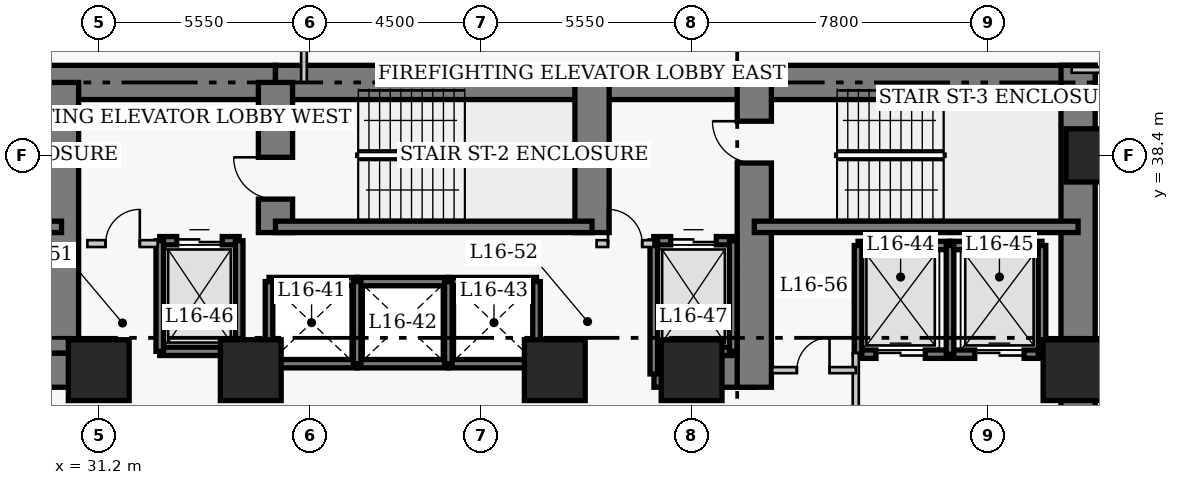
"""IFC4 building model, lengths in metres.
Left out: names, types, materials, properties, quantities, classifications, styles, units other than length and angle.
Written with IfcOpenShell. Run it as: python <this file> out.ifc"""

import sys

from ifc_helpers import new_model, si_unit, direction, frame, frame_2d, origin, origin_2d, place, context, subcontext, project, spatial, rectangle, extrude, element, fill, save


model = new_model("IFC4")
c1 = context("Model", 3, precision=1e-05, world=origin(), true_north=direction((0.0, 1.0)))
c2 = subcontext(c1, "Body", "Model", "MODEL_VIEW")
j1 = project(units=[si_unit("LENGTHUNIT", "METRE"), si_unit("PLANEANGLEUNIT", "RADIAN")], contexts=[c1])
p1 = place(None, origin())
s1 = spatial("IfcSite", under=j1, at=p1, CompositionType="ELEMENT")
p2 = place(p1, origin())
s2 = spatial("IfcBuilding", under=s1, at=p2, CompositionType="ELEMENT")
p3 = place(p2, frame((0.0, 0.0, 67.8)))
s3 = spatial("IfcBuildingStorey", under=s2, at=p3, CompositionType="ELEMENT", Elevation=67.8)
p4 = place(p3, frame((21.45, 40.32, 0.0), z_axis=(0.0, 0.0, 1.0), x_axis=(1.0, 0.0, 0.0)))
e1 = element("IfcWall", 1, at=p4, inside=s3, PredefinedType="SHEAR", context=c2, shape_type="SweptSolid", body=[
    extrude(rectangle(XDim=14.4, YDim=0.9, at=frame_2d((7.2, 0.0))), origin(), (0.0, 0.0, 1.0), 3.8),
])
p5 = place(p3, frame((35.85, 40.32, 0.0), z_axis=(0.0, 0.0, 1.0), x_axis=(1.0, 0.0, 0.0)))
e2 = element("IfcWall", 2, at=p5, inside=s3, PredefinedType="SHEAR", context=c2, shape_type="SweptSolid", body=[
    extrude(rectangle(XDim=12.6, YDim=0.9, at=frame_2d((6.3, 0.0))), origin(), (0.0, 0.0, 1.0), 3.8),
])
p6 = place(p3, frame((48.45, 40.32, 0.0), z_axis=(0.0, 0.0, 1.0), x_axis=(1.0, 0.0, 0.0)))
e3 = element("IfcWall", 3, at=p6, inside=s3, PredefinedType="SHEAR", context=c2, shape_type="SweptSolid", body=[
    extrude(rectangle(XDim=8.97, YDim=0.9, at=frame_2d((4.485, 0.0))), origin(), (0.0, 0.0, 1.0), 3.8),
])
p7 = place(p3, frame((56.97, 27.05, 0.0), z_axis=(0.0, 0.0, 1.0), x_axis=(0.0, 1.0, 0.0)))
e4 = element("IfcWall", 4, at=p7, inside=s3, PredefinedType="SHEAR", context=c2, shape_type="SweptSolid", body=[
    extrude(rectangle(XDim=13.72, YDim=0.9, at=frame_2d((6.86, 0.0))), origin(), (0.0, 0.0, 1.0), 3.8),
])
p8 = place(p3, frame((28.45, 32.75, 0.0), z_axis=(0.0, 0.0, 1.0), x_axis=(1.0, 0.0, 0.0)))
e5 = element("IfcWall", 5, at=p8, inside=s3, PredefinedType="SHEAR", context=c2, shape_type="SweptSolid", body=[
    extrude(rectangle(XDim=2.4, YDim=0.9, at=frame_2d((1.2, 0.0))), origin(), (0.0, 0.0, 1.0), 3.8),
])
p9 = place(p3, frame((45.81, 32.75, 0.0), z_axis=(0.0, 0.0, 1.0), x_axis=(1.0, 0.0, 0.0)))
e6 = element("IfcWall", 6, at=p9, inside=s3, PredefinedType="SHEAR", context=c2, shape_type="SweptSolid", body=[
    extrude(rectangle(XDim=2.64, YDim=0.9, at=frame_2d((1.32, 0.0))), origin(), (0.0, 0.0, 1.0), 3.8),
])
p10 = place(p3, frame((30.22, 33.2, 0.0), z_axis=(0.0, 0.0, 1.0), x_axis=(0.0, 1.0, 0.0)))
e7 = element("IfcWall", 7, at=p10, inside=s3, PredefinedType="SHEAR", context=c2, shape_type="SweptSolid", body=[
    extrude(rectangle(XDim=7.12, YDim=0.9, at=frame_2d((3.56, 0.0))), origin(), (0.0, 0.0, 1.0), 3.8),
])
p11 = place(p3, frame((35.85, 36.37, 0.0), z_axis=(0.0, 0.0, 1.0), x_axis=(0.0, 1.0, 0.0)))
e8 = element("IfcWall", 8, at=p11, inside=s3, PredefinedType="SHEAR", context=c2, shape_type="SweptSolid", body=[
    extrude(rectangle(XDim=3.95, YDim=0.9, at=frame_2d((1.975, 0.0))), origin(), (0.0, 0.0, 1.0), 3.8),
])
p12 = place(p11, frame((0.88, 0.0, 0.0)))
e9 = element("IfcOpeningElement", 9, at=p12, cuts=e8, PredefinedType="OPENING", context=c2, shape_type="SweptSolid", body=[
    extrude(rectangle(XDim=1.1, YDim=2.15, at=frame_2d((0.55, 1.075))), frame((0.0, 0.46, 0.0), z_axis=(0.0, -1.0, 0.0), x_axis=(1.0, 0.0, 0.0)), (0.0, 0.0, 1.0), 0.92),
])
p13 = place(p3, frame((44.18, 36.37, 0.0), z_axis=(0.0, 0.0, 1.0), x_axis=(0.0, 1.0, 0.0)))
e10 = element("IfcWall", 10, at=p13, inside=s3, PredefinedType="SHEAR", context=c2, shape_type="SweptSolid", body=[
    extrude(rectangle(XDim=3.95, YDim=0.9, at=frame_2d((1.975, 0.0))), origin(), (0.0, 0.0, 1.0), 3.8),
])
p14 = place(p3, frame((48.45, 32.3, 0.0), z_axis=(0.0, 0.0, 1.0), x_axis=(0.0, 1.0, 0.0)))
e11 = element("IfcWall", 11, at=p14, inside=s3, PredefinedType="SHEAR", context=c2, shape_type="SweptSolid", body=[
    extrude(rectangle(XDim=8.02, YDim=0.9, at=frame_2d((4.01, 0.0))), origin(), (0.0, 0.0, 1.0), 3.8),
])
p15 = place(p14, frame((5.9, 0.0, 0.0)))
e12 = element("IfcOpeningElement", 12, at=p15, cuts=e11, PredefinedType="OPENING", context=c2, shape_type="SweptSolid", body=[
    extrude(rectangle(XDim=1.1, YDim=2.15, at=frame_2d((0.55, 1.075))), frame((0.0, 0.46, 0.0), z_axis=(0.0, -1.0, 0.0), x_axis=(1.0, 0.0, 0.0)), (0.0, 0.0, 1.0), 0.92),
])
p16 = place(p3, frame((21.9, 36.52, 0.0), z_axis=(0.0, 0.0, 1.0), x_axis=(1.0, 0.0, 0.0)))
e13 = element("IfcWall", 13, at=p16, inside=s3, PredefinedType="SHEAR", context=c2, shape_type="SweptSolid", body=[
    extrude(rectangle(XDim=8.32, YDim=0.3, at=frame_2d((4.16, 0.0))), origin(), (0.0, 0.0, 1.0), 3.8),
])
p17 = place(p16, frame((0.9, 0.0, 0.0)))
e14 = element("IfcOpeningElement", 14, at=p17, cuts=e13, PredefinedType="OPENING", context=c2, shape_type="SweptSolid", body=[
    extrude(rectangle(XDim=1.1, YDim=2.15, at=frame_2d((0.55, 1.075))), frame((0.0, 0.16, 0.0), z_axis=(0.0, -1.0, 0.0), x_axis=(1.0, 0.0, 0.0)), (0.0, 0.0, 1.0), 0.32),
])
p18 = place(p3, frame((35.85, 36.52, 0.0), z_axis=(0.0, 0.0, 1.0), x_axis=(1.0, 0.0, 0.0)))
e15 = element("IfcWall", 15, at=p18, inside=s3, PredefinedType="SHEAR", context=c2, shape_type="SweptSolid", body=[
    extrude(rectangle(XDim=8.33, YDim=0.3, at=frame_2d((4.165, 0.0))), origin(), (0.0, 0.0, 1.0), 3.8),
])
p19 = place(p3, frame((48.45, 36.52, 0.0), z_axis=(0.0, 0.0, 1.0), x_axis=(1.0, 0.0, 0.0)))
e16 = element("IfcWall", 16, at=p19, inside=s3, PredefinedType="SHEAR", context=c2, shape_type="SweptSolid", body=[
    extrude(rectangle(XDim=8.52, YDim=0.3, at=frame_2d((4.26, 0.0))), origin(), (0.0, 0.0, 1.0), 3.8),
])
p20 = place(p3, frame((57.35, 38.4, 0.0), z_axis=(0.0, 0.0, 1.0), x_axis=(1.0, 0.0, 0.0)))
e17 = element("IfcColumn", 17, at=p20, inside=s3, PredefinedType="COLUMN", context=c2, shape_type="SweptSolid", body=[
    extrude(rectangle(XDim=1.4, YDim=1.4, at=origin_2d()), origin(), (0.0, 0.0, 1.0), 3.8),
])
for number, where, z_axis, x_axis in (
    (18, (31.2, 32.75, 0.0), (0.0, 0.0, 1.0), (1.0, 0.0, 0.0)),
    (19, (35.2, 32.75, 0.0), (0.0, 0.0, 1.0), (1.0, 0.0, 0.0)),
    (20, (43.2, 32.75, 0.0), (0.0, 0.0, 1.0), (1.0, 0.0, 0.0)),
    (21, (46.8, 32.75, 0.0), (0.0, 0.0, 1.0), (1.0, 0.0, 0.0)),
    (22, (56.85, 32.75, 0.0), (0.0, 0.0, 1.0), (1.0, 0.0, 0.0)),
):
    element("IfcColumn", number, at=place(p3, frame(where, z_axis=z_axis, x_axis=x_axis)), inside=s3, PredefinedType="COLUMN", context=c2, shape_type="SweptSolid", body=[
        extrude(rectangle(XDim=1.6, YDim=1.6, at=origin_2d()), origin(), (0.0, 0.0, 1.0), 3.8),
    ])
for number, where, z_axis, x_axis in (
    (23, (35.68, 35.08, 0.0), (0.0, 0.0, 1.0), (1.0, 0.0, 0.0)),
    (24, (35.68, 32.92, 0.0), (0.0, 0.0, 1.0), (1.0, 0.0, 0.0)),
):
    element("IfcWall", number, at=place(p3, frame(where, z_axis=z_axis, x_axis=x_axis)), inside=s3, PredefinedType="SHEAR", context=c2, shape_type="SweptSolid", body=[
        extrude(rectangle(XDim=2.32, YDim=0.22, at=frame_2d((1.16, 0.0))), origin(), (0.0, 0.0, 1.0), 3.8),
    ])
p21 = place(p3, frame((35.68, 32.92, 0.0), z_axis=(0.0, 0.0, 1.0), x_axis=(0.0, 1.0, 0.0)))
e25 = element("IfcWall", 25, at=p21, inside=s3, PredefinedType="SHEAR", context=c2, shape_type="SweptSolid", body=[
    extrude(rectangle(XDim=2.16, YDim=0.2, at=frame_2d((1.08, 0.0))), origin(), (0.0, 0.0, 1.0), 3.8),
])
for number, where, z_axis, x_axis in (
    (26, (38.0, 35.08, 0.0), (0.0, 0.0, 1.0), (1.0, 0.0, 0.0)),
    (27, (38.0, 32.92, 0.0), (0.0, 0.0, 1.0), (1.0, 0.0, 0.0)),
):
    element("IfcWall", number, at=place(p3, frame(where, z_axis=z_axis, x_axis=x_axis)), inside=s3, PredefinedType="SHEAR", context=c2, shape_type="SweptSolid", body=[
        extrude(rectangle(XDim=2.4, YDim=0.22, at=frame_2d((1.2, 0.0))), origin(), (0.0, 0.0, 1.0), 3.8),
    ])
p22 = place(p3, frame((38.0, 32.92, 0.0), z_axis=(0.0, 0.0, 1.0), x_axis=(0.0, 1.0, 0.0)))
e28 = element("IfcWall", 28, at=p22, inside=s3, PredefinedType="SHEAR", context=c2, shape_type="SweptSolid", body=[
    extrude(rectangle(XDim=2.16, YDim=0.2, at=frame_2d((1.08, 0.0))), origin(), (0.0, 0.0, 1.0), 3.8),
])
for number, where, z_axis, x_axis in (
    (29, (40.4, 35.08, 0.0), (0.0, 0.0, 1.0), (1.0, 0.0, 0.0)),
    (30, (40.4, 32.92, 0.0), (0.0, 0.0, 1.0), (1.0, 0.0, 0.0)),
):
    element("IfcWall", number, at=place(p3, frame(where, z_axis=z_axis, x_axis=x_axis)), inside=s3, PredefinedType="SHEAR", context=c2, shape_type="SweptSolid", body=[
        extrude(rectangle(XDim=2.32, YDim=0.22, at=frame_2d((1.16, 0.0))), origin(), (0.0, 0.0, 1.0), 3.8),
    ])
for number, where, z_axis, x_axis in (
    (31, (40.4, 32.92, 0.0), (0.0, 0.0, 1.0), (0.0, 1.0, 0.0)),
    (32, (42.72, 32.92, 0.0), (0.0, 0.0, 1.0), (0.0, 1.0, 0.0)),
):
    element("IfcWall", number, at=place(p3, frame(where, z_axis=z_axis, x_axis=x_axis)), inside=s3, PredefinedType="SHEAR", context=c2, shape_type="SweptSolid", body=[
        extrude(rectangle(XDim=2.16, YDim=0.2, at=frame_2d((1.08, 0.0))), origin(), (0.0, 0.0, 1.0), 3.8),
    ])
p23 = place(p3, frame((51.18, 36.03, 0.0), z_axis=(0.0, 0.0, 1.0), x_axis=(1.0, 0.0, 0.0)))
e33 = element("IfcWall", 33, at=p23, inside=s3, PredefinedType="SHEAR", context=c2, shape_type="SweptSolid", body=[
    extrude(rectangle(XDim=2.42, YDim=0.22, at=frame_2d((1.21, 0.0))), origin(), (0.0, 0.0, 1.0), 3.8),
])
p24 = place(p3, frame((51.18, 33.17, 0.0), z_axis=(0.0, 0.0, 1.0), x_axis=(1.0, 0.0, 0.0)))
e34 = element("IfcWall", 34, at=p24, inside=s3, PredefinedType="SHEAR", context=c2, shape_type="SweptSolid", body=[
    extrude(rectangle(XDim=2.42, YDim=0.22, at=frame_2d((1.21, 0.0))), origin(), (0.0, 0.0, 1.0), 3.8),
])
p25 = place(p24, frame((0.47, 0.0, 0.0)))
e35 = element("IfcOpeningElement", 35, at=p25, cuts=e34, PredefinedType="OPENING", context=c2, shape_type="SweptSolid", body=[
    extrude(rectangle(XDim=1.3, YDim=2.15, at=frame_2d((0.65, 1.075))), frame((0.0, 0.12, 0.0), z_axis=(0.0, -1.0, 0.0), x_axis=(1.0, 0.0, 0.0)), (0.0, 0.0, 1.0), 0.24),
])
p26 = place(p3, frame((51.18, 33.17, 0.0), z_axis=(0.0, 0.0, 1.0), x_axis=(0.0, 1.0, 0.0)))
e36 = element("IfcWall", 36, at=p26, inside=s3, PredefinedType="SHEAR", context=c2, shape_type="SweptSolid", body=[
    extrude(rectangle(XDim=2.86, YDim=0.2, at=frame_2d((1.43, 0.0))), origin(), (0.0, 0.0, 1.0), 3.8),
])
p27 = place(p3, frame((53.6, 36.03, 0.0), z_axis=(0.0, 0.0, 1.0), x_axis=(1.0, 0.0, 0.0)))
e37 = element("IfcWall", 37, at=p27, inside=s3, PredefinedType="SHEAR", context=c2, shape_type="SweptSolid", body=[
    extrude(rectangle(XDim=2.42, YDim=0.22, at=frame_2d((1.21, 0.0))), origin(), (0.0, 0.0, 1.0), 3.8),
])
p28 = place(p3, frame((53.6, 33.17, 0.0), z_axis=(0.0, 0.0, 1.0), x_axis=(1.0, 0.0, 0.0)))
e38 = element("IfcWall", 38, at=p28, inside=s3, PredefinedType="SHEAR", context=c2, shape_type="SweptSolid", body=[
    extrude(rectangle(XDim=2.42, YDim=0.22, at=frame_2d((1.21, 0.0))), origin(), (0.0, 0.0, 1.0), 3.8),
])
p29 = place(p28, frame((0.65, 0.0, 0.0)))
e39 = element("IfcOpeningElement", 39, at=p29, cuts=e38, PredefinedType="OPENING", context=c2, shape_type="SweptSolid", body=[
    extrude(rectangle(XDim=1.3, YDim=2.15, at=frame_2d((0.65, 1.075))), frame((0.0, 0.12, 0.0), z_axis=(0.0, -1.0, 0.0), x_axis=(1.0, 0.0, 0.0)), (0.0, 0.0, 1.0), 0.24),
])
for number, where, z_axis, x_axis in (
    (40, (53.6, 33.17, 0.0), (0.0, 0.0, 1.0), (0.0, 1.0, 0.0)),
    (41, (56.02, 33.17, 0.0), (0.0, 0.0, 1.0), (0.0, 1.0, 0.0)),
):
    element("IfcWall", number, at=place(p3, frame(where, z_axis=z_axis, x_axis=x_axis)), inside=s3, PredefinedType="SHEAR", context=c2, shape_type="SweptSolid", body=[
        extrude(rectangle(XDim=2.86, YDim=0.2, at=frame_2d((1.43, 0.0))), origin(), (0.0, 0.0, 1.0), 3.8),
    ])
p30 = place(p3, frame((32.805, 36.155, 0.0), z_axis=(0.0, 0.0, 1.0), x_axis=(1.0, 0.0, 0.0)))
e42 = element("IfcWall", 42, at=p30, inside=s3, PredefinedType="SHEAR", context=c2, shape_type="SweptSolid", body=[
    extrude(rectangle(XDim=2.09, YDim=0.22, at=frame_2d((1.045, 0.0))), origin(), (0.0, 0.0, 1.0), 3.8),
])
p31 = place(p30, frame((0.445, 0.0, 0.0)))
e43 = element("IfcOpeningElement", 43, at=p31, cuts=e42, PredefinedType="OPENING", context=c2, shape_type="SweptSolid", body=[
    extrude(rectangle(XDim=1.2, YDim=2.15, at=frame_2d((0.6, 1.075))), frame((0.0, 0.12, 0.0), z_axis=(0.0, -1.0, 0.0), x_axis=(1.0, 0.0, 0.0)), (0.0, 0.0, 1.0), 0.24),
])
p32 = place(p3, frame((32.805, 33.245, 0.0), z_axis=(0.0, 0.0, 1.0), x_axis=(1.0, 0.0, 0.0)))
e44 = element("IfcWall", 44, at=p32, inside=s3, PredefinedType="SHEAR", context=c2, shape_type="SweptSolid", body=[
    extrude(rectangle(XDim=2.09, YDim=0.22, at=frame_2d((1.045, 0.0))), origin(), (0.0, 0.0, 1.0), 3.8),
])
for number, where, z_axis, x_axis in (
    (45, (32.805, 33.245, 0.0), (0.0, 0.0, 1.0), (0.0, 1.0, 0.0)),
    (46, (34.895, 33.245, 0.0), (0.0, 0.0, 1.0), (0.0, 1.0, 0.0)),
):
    element("IfcWall", number, at=place(p3, frame(where, z_axis=z_axis, x_axis=x_axis)), inside=s3, PredefinedType="SHEAR", context=c2, shape_type="SweptSolid", body=[
        extrude(rectangle(XDim=2.91, YDim=0.2, at=frame_2d((1.455, 0.0))), origin(), (0.0, 0.0, 1.0), 3.8),
    ])
p33 = place(p3, frame((45.805, 36.155, 0.0), z_axis=(0.0, 0.0, 1.0), x_axis=(1.0, 0.0, 0.0)))
e47 = element("IfcWall", 47, at=p33, inside=s3, PredefinedType="SHEAR", context=c2, shape_type="SweptSolid", body=[
    extrude(rectangle(XDim=2.09, YDim=0.22, at=frame_2d((1.045, 0.0))), origin(), (0.0, 0.0, 1.0), 3.8),
])
p34 = place(p33, frame((0.445, 0.0, 0.0)))
e48 = element("IfcOpeningElement", 48, at=p34, cuts=e47, PredefinedType="OPENING", context=c2, shape_type="SweptSolid", body=[
    extrude(rectangle(XDim=1.2, YDim=2.15, at=frame_2d((0.6, 1.075))), frame((0.0, 0.12, 0.0), z_axis=(0.0, -1.0, 0.0), x_axis=(1.0, 0.0, 0.0)), (0.0, 0.0, 1.0), 0.24),
])
p35 = place(p3, frame((45.805, 33.245, 0.0), z_axis=(0.0, 0.0, 1.0), x_axis=(1.0, 0.0, 0.0)))
e49 = element("IfcWall", 49, at=p35, inside=s3, PredefinedType="SHEAR", context=c2, shape_type="SweptSolid", body=[
    extrude(rectangle(XDim=2.09, YDim=0.22, at=frame_2d((1.045, 0.0))), origin(), (0.0, 0.0, 1.0), 3.8),
])
p36 = place(p3, frame((45.805, 32.65, 0.0), z_axis=(0.0, 0.0, 1.0), x_axis=(0.0, 1.0, 0.0)))
e50 = element("IfcWall", 50, at=p36, inside=s3, PredefinedType="SHEAR", context=c2, shape_type="SweptSolid", body=[
    extrude(rectangle(XDim=3.505, YDim=0.2, at=frame_2d((1.752, 0.0))), origin(), (0.0, 0.0, 1.0), 3.8),
])
p37 = place(p3, frame((47.895, 33.245, 0.0), z_axis=(0.0, 0.0, 1.0), x_axis=(0.0, 1.0, 0.0)))
e51 = element("IfcWall", 51, at=p37, inside=s3, PredefinedType="SHEAR", context=c2, shape_type="SweptSolid", body=[
    extrude(rectangle(XDim=2.91, YDim=0.2, at=frame_2d((1.455, 0.0))), origin(), (0.0, 0.0, 1.0), 3.8),
])
p38 = place(p3, frame((30.9, 36.08, 0.0), z_axis=(0.0, 0.0, 1.0), x_axis=(1.0, 0.0, 0.0)))
e52 = element("IfcWall", 52, at=p38, inside=s3, PredefinedType="PARTITIONING", context=c2, shape_type="SweptSolid", body=[
    extrude(rectangle(XDim=1.85, YDim=0.18, at=frame_2d((0.925, 0.0))), origin(), (0.0, 0.0, 1.0), 3.54),
])
p39 = place(p38, frame((0.48, 0.0, 0.0)))
e53 = element("IfcOpeningElement", 53, at=p39, cuts=e52, PredefinedType="OPENING", context=c2, shape_type="SweptSolid", body=[
    extrude(rectangle(XDim=0.9, YDim=2.15, at=frame_2d((0.45, 1.075))), frame((0.0, 0.1, 0.0), z_axis=(0.0, -1.0, 0.0), x_axis=(1.0, 0.0, 0.0)), (0.0, 0.0, 1.0), 0.2),
])
p40 = place(p3, frame((44.3, 36.08, 0.0), z_axis=(0.0, 0.0, 1.0), x_axis=(1.0, 0.0, 0.0)))
e54 = element("IfcWall", 54, at=p40, inside=s3, PredefinedType="PARTITIONING", context=c2, shape_type="SweptSolid", body=[
    extrude(rectangle(XDim=1.5, YDim=0.18, at=frame_2d((0.75, 0.0))), origin(), (0.0, 0.0, 1.0), 3.54),
])
p41 = place(p40, frame((0.3, 0.0, 0.0)))
e55 = element("IfcOpeningElement", 55, at=p41, cuts=e54, PredefinedType="OPENING", context=c2, shape_type="SweptSolid", body=[
    extrude(rectangle(XDim=0.9, YDim=2.15, at=frame_2d((0.45, 1.075))), frame((0.0, 0.1, 0.0), z_axis=(0.0, -1.0, 0.0), x_axis=(1.0, 0.0, 0.0)), (0.0, 0.0, 1.0), 0.2),
])
p42 = place(p3, frame((51.12, 29.5, 0.0), z_axis=(0.0, 0.0, 1.0), x_axis=(0.0, 1.0, 0.0)))
e56 = element("IfcWall", 56, at=p42, inside=s3, PredefinedType="PARTITIONING", context=c2, shape_type="SweptSolid", body=[
    extrude(rectangle(XDim=3.7, YDim=0.16, at=frame_2d((1.85, 0.0))), origin(), (0.0, 0.0, 1.0), 3.54),
])
p43 = place(p42, frame((0.9, 0.0, 0.0)))
e57 = element("IfcOpeningElement", 57, at=p43, cuts=e56, PredefinedType="OPENING", context=c2, shape_type="SweptSolid", body=[
    extrude(rectangle(XDim=1.1, YDim=2.15, at=frame_2d((0.55, 1.075))), frame((0.0, 0.09, 0.0), z_axis=(0.0, -1.0, 0.0), x_axis=(1.0, 0.0, 0.0)), (0.0, 0.0, 1.0), 0.18),
])
p44 = place(p3, frame((48.92, 32.75, 0.0), z_axis=(0.0, 0.0, 1.0), x_axis=(1.0, 0.0, 0.0)))
e58 = element("IfcWall", 58, at=p44, inside=s3, PredefinedType="PARTITIONING", context=c2, shape_type="SweptSolid", body=[
    extrude(rectangle(XDim=2.2, YDim=0.16, at=frame_2d((1.1, 0.0))), origin(), (0.0, 0.0, 1.0), 3.54),
])
p45 = place(p44, frame((0.65, 0.0, 0.0)))
e59 = element("IfcOpeningElement", 59, at=p45, cuts=e58, PredefinedType="OPENING", context=c2, shape_type="SweptSolid", body=[
    extrude(rectangle(XDim=0.86, YDim=2.05, at=frame_2d((0.43, 1.025))), frame((0.0, 0.09, 0.0), z_axis=(0.0, -1.0, 0.0), x_axis=(1.0, 0.0, 0.0)), (0.0, 0.0, 1.0), 0.18),
])
p46 = place(p3, frame((56.8, 40.65, 0.0), z_axis=(0.0, 0.0, 1.0), x_axis=(1.0, 0.0, 0.0)))
e60 = element("IfcWall", 60, at=p46, inside=s3, PredefinedType="PARTITIONING", context=c2, shape_type="SweptSolid", body=[
    extrude(rectangle(XDim=4.66, YDim=0.15, at=frame_2d((2.33, 0.0))), origin(), (0.0, 0.0, 1.0), 3.54),
])
p47 = place(p46, frame((3.05, 0.0, 0.0)))
e61 = element("IfcOpeningElement", 61, at=p47, cuts=e60, PredefinedType="OPENING", context=c2, shape_type="SweptSolid", body=[
    extrude(rectangle(XDim=1.0, YDim=2.15, at=frame_2d((0.5, 1.075))), frame((0.0, 0.085, 0.0), z_axis=(0.0, -1.0, 0.0), x_axis=(1.0, 0.0, 0.0)), (0.0, 0.0, 1.0), 0.17),
])
p48 = place(p3, frame((36.6, 40.32, 0.0), z_axis=(0.0, 0.0, 1.0), x_axis=(0.0, 1.0, 0.0)))
e62 = element("IfcWall", 62, at=p48, inside=s3, PredefinedType="PARTITIONING", context=c2, shape_type="SweptSolid", body=[
    extrude(rectangle(XDim=5.045, YDim=0.15, at=frame_2d((2.522, 0.0))), origin(), (0.0, 0.0, 1.0), 3.54),
])
p49 = place(p25, origin())
e63 = element("IfcDoor", 63, at=p49, inside=s3, OperationType="DOUBLE_DOOR_SLIDING", PredefinedType="DOOR", context=c2, shape_type="SweptSolid", body=[
    extrude(rectangle(XDim=1.3, YDim=2.15, at=frame_2d((0.65, 1.075))), frame((0.0, 0.025, 0.0), z_axis=(0.0, -1.0, 0.0), x_axis=(1.0, 0.0, 0.0)), (0.0, 0.0, 1.0), 0.05),
])
fill(e35, e63)
p50 = place(p29, origin())
e64 = element("IfcDoor", 64, at=p50, inside=s3, OperationType="DOUBLE_DOOR_SLIDING", PredefinedType="DOOR", context=c2, shape_type="SweptSolid", body=[
    extrude(rectangle(XDim=1.3, YDim=2.15, at=frame_2d((0.65, 1.075))), frame((0.0, 0.025, 0.0), z_axis=(0.0, -1.0, 0.0), x_axis=(1.0, 0.0, 0.0)), (0.0, 0.0, 1.0), 0.05),
])
fill(e39, e64)
p51 = place(p31, origin())
e65 = element("IfcDoor", 65, at=p51, inside=s3, OperationType="DOUBLE_DOOR_SLIDING", PredefinedType="DOOR", context=c2, shape_type="SweptSolid", body=[
    extrude(rectangle(XDim=1.2, YDim=2.15, at=frame_2d((0.6, 1.075))), frame((0.0, 0.025, 0.0), z_axis=(0.0, -1.0, 0.0), x_axis=(1.0, 0.0, 0.0)), (0.0, 0.0, 1.0), 0.05),
])
fill(e43, e65)
p52 = place(p34, origin())
e66 = element("IfcDoor", 66, at=p52, inside=s3, OperationType="DOUBLE_DOOR_SLIDING", PredefinedType="DOOR", context=c2, shape_type="SweptSolid", body=[
    extrude(rectangle(XDim=1.2, YDim=2.15, at=frame_2d((0.6, 1.075))), frame((0.0, 0.025, 0.0), z_axis=(0.0, -1.0, 0.0), x_axis=(1.0, 0.0, 0.0)), (0.0, 0.0, 1.0), 0.05),
])
fill(e48, e66)
p53 = place(p39, origin())
e67 = element("IfcDoor", 67, at=p53, inside=s3, OperationType="SINGLE_SWING_RIGHT", PredefinedType="DOOR", context=c2, shape_type="SweptSolid", body=[
    extrude(rectangle(XDim=0.9, YDim=2.15, at=frame_2d((0.45, 1.075))), frame((0.0, 0.025, 0.0), z_axis=(0.0, -1.0, 0.0), x_axis=(1.0, 0.0, 0.0)), (0.0, 0.0, 1.0), 0.05),
])
fill(e53, e67)
p54 = place(p41, origin())
e68 = element("IfcDoor", 68, at=p54, inside=s3, OperationType="SINGLE_SWING_LEFT", PredefinedType="DOOR", context=c2, shape_type="SweptSolid", body=[
    extrude(rectangle(XDim=0.9, YDim=2.15, at=frame_2d((0.45, 1.075))), frame((0.0, 0.025, 0.0), z_axis=(0.0, -1.0, 0.0), x_axis=(1.0, 0.0, 0.0)), (0.0, 0.0, 1.0), 0.05),
])
fill(e55, e68)
p55 = place(p45, origin())
e69 = element("IfcDoor", 69, at=p55, inside=s3, OperationType="SINGLE_SWING_RIGHT", PredefinedType="DOOR", context=c2, shape_type="SweptSolid", body=[
    extrude(rectangle(XDim=0.86, YDim=2.05, at=frame_2d((0.43, 1.025))), frame((0.0, 0.025, 0.0), z_axis=(0.0, -1.0, 0.0), x_axis=(1.0, 0.0, 0.0)), (0.0, 0.0, 1.0), 0.05),
])
fill(e59, e69)
p56 = place(p12, origin())
e70 = element("IfcDoor", 70, at=p56, inside=s3, OperationType="SINGLE_SWING_RIGHT", PredefinedType="DOOR", context=c2, shape_type="SweptSolid", body=[
    extrude(rectangle(XDim=1.1, YDim=2.15, at=frame_2d((0.55, 1.075))), frame((0.0, 0.025, 0.0), z_axis=(0.0, -1.0, 0.0), x_axis=(1.0, 0.0, 0.0)), (0.0, 0.0, 1.0), 0.05),
])
fill(e9, e70)
p57 = place(p15, origin())
e71 = element("IfcDoor", 71, at=p57, inside=s3, OperationType="SINGLE_SWING_RIGHT", PredefinedType="DOOR", context=c2, shape_type="SweptSolid", body=[
    extrude(rectangle(XDim=1.1, YDim=2.15, at=frame_2d((0.55, 1.075))), frame((0.0, 0.025, 0.0), z_axis=(0.0, -1.0, 0.0), x_axis=(1.0, 0.0, 0.0)), (0.0, 0.0, 1.0), 0.05),
])
fill(e12, e71)
save(model, sys.argv[1])
